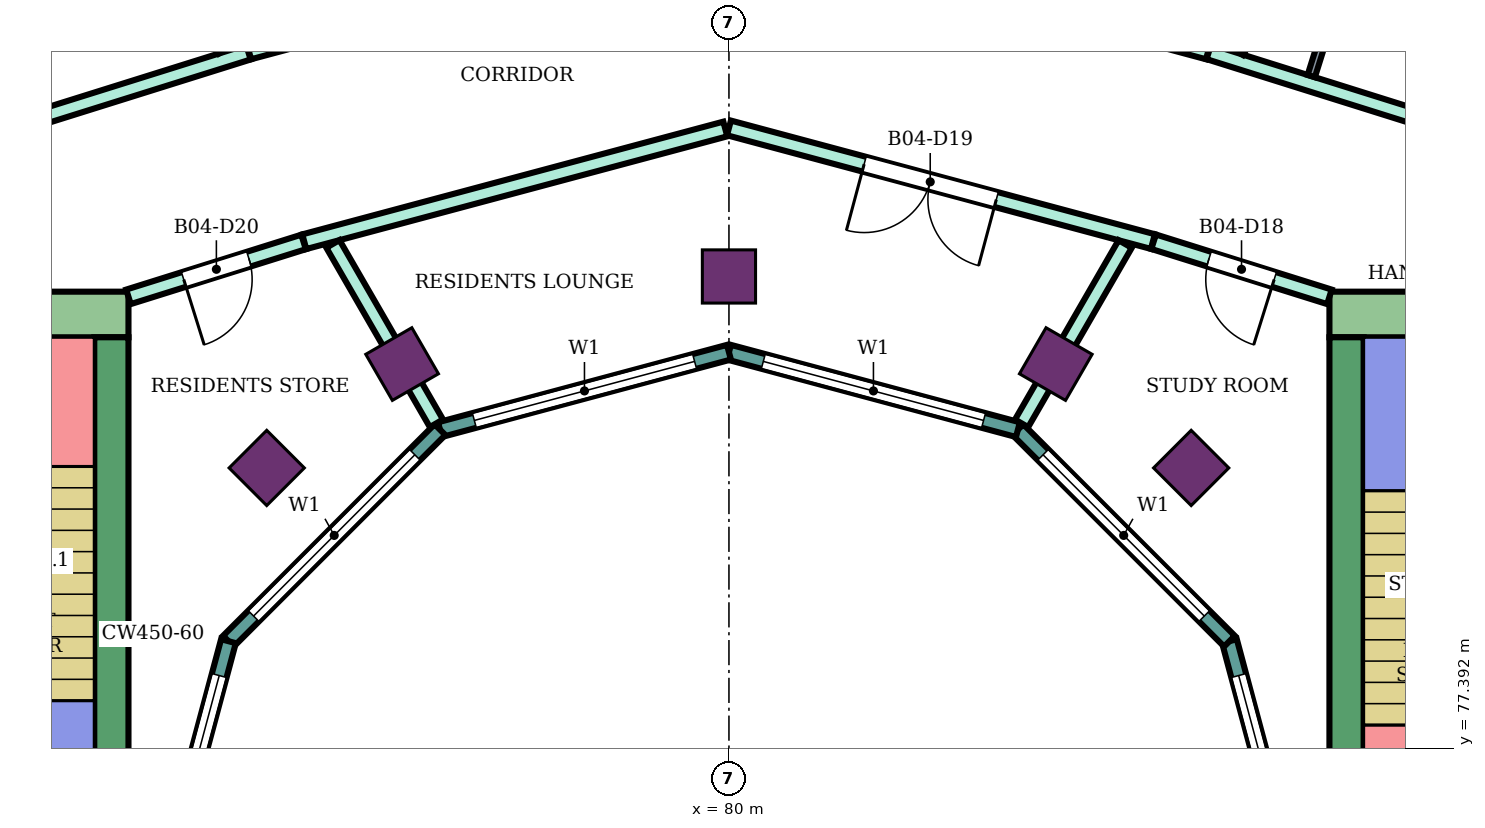
"""IFC4 building model, lengths in metres.
Left out: names, types, materials, properties, quantities, classifications, styles, units other than length and angle.
Written with IfcOpenShell. Run it as: python <this file> out.ifc"""

import sys

from ifc_helpers import new_model, si_unit, direction, frame, frame_2d, origin, origin_2d, place, context, subcontext, project, spatial, rectangle, extrude, element, fill, save


model = new_model("IFC4")
c1 = context("Model", 3, precision=1e-05, world=origin(), true_north=direction((0.0, 1.0)))
c2 = subcontext(c1, "Body", "Model", "MODEL_VIEW")
j1 = project(units=[si_unit("LENGTHUNIT", "METRE"), si_unit("PLANEANGLEUNIT", "RADIAN")], contexts=[c1])
p1 = place(None, origin())
s1 = spatial("IfcSite", under=j1, at=p1, CompositionType="ELEMENT")
p2 = place(p1, origin())
s2 = spatial("IfcBuilding", under=s1, at=p2, CompositionType="ELEMENT")
p3 = place(p2, frame((0.0, 0.0, 258.3)))
s3 = spatial("IfcBuildingStorey", under=s2, at=p3, CompositionType="ELEMENT", Elevation=258.3)
for number, where, z_axis, x_axis in (
    (1, (86.081, 81.081, 0.0), (0.0, 0.0, 1.0), (0.707, 0.707, 0.0)),
    (2, (84.3, 82.448, 0.0), (0.0, 0.0, 1.0), (0.5, 0.866, 0.0)),
    (3, (80.0, 83.6, 0.0), (0.0, 0.0, 1.0), (0.0, 1.0, 0.0)),
    (4, (75.7, 82.448, 0.0), (0.0, 0.0, 1.0), (-0.5, 0.866, 0.0)),
    (5, (73.919, 81.081, 0.0), (0.0, 0.0, 1.0), (-0.707, 0.707, 0.0)),
):
    element("IfcColumn", number, at=place(p3, frame(where, z_axis=z_axis, x_axis=x_axis)), inside=s3, PredefinedType="COLUMN", context=c2, shape_type="SweptSolid", body=[
        extrude(rectangle(XDim=0.7, YDim=0.7, at=origin_2d()), origin(), (0.0, 0.0, 1.0), 4.2),
    ])
p4 = place(p3, frame((87.9, 83.1, 0.0), z_axis=(0.0, 0.0, 1.0), x_axis=(1.0, 0.0, 0.0)))
e6 = element("IfcWall", 6, at=p4, inside=s3, PredefinedType="SHEAR", context=c2, shape_type="SweptSolid", body=[
    extrude(rectangle(XDim=14.9, YDim=0.6, at=frame_2d((7.45, 0.0))), origin(), (0.0, 0.0, 1.0), 3.88),
])
p5 = place(p4, frame((4.2, 0.0, 0.0)))
e7 = element("IfcOpeningElement", 7, at=p5, cuts=e6, PredefinedType="OPENING", context=c2, shape_type="SweptSolid", body=[
    extrude(rectangle(XDim=2.4, YDim=2.4, at=frame_2d((1.2, 1.2))), frame((0.0, 0.31, 0.0), z_axis=(0.0, -1.0, 0.0), x_axis=(1.0, 0.0, 0.0)), (0.0, 0.0, 1.0), 0.62),
])
p6 = place(p3, frame((88.125, 75.0, 0.0), z_axis=(0.0, 0.0, 1.0), x_axis=(0.0, 1.0, 0.0)))
e8 = element("IfcWall", 8, at=p6, inside=s3, PredefinedType="SHEAR", context=c2, shape_type="SweptSolid", body=[
    extrude(rectangle(XDim=7.8, YDim=0.45, at=frame_2d((3.9, 0.0))), origin(), (0.0, 0.0, 1.0), 3.88),
])
p7 = place(p3, frame((72.1, 83.1, 0.0), z_axis=(0.0, 0.0, 1.0), x_axis=(-1.0, 0.0, 0.0)))
e9 = element("IfcWall", 9, at=p7, inside=s3, PredefinedType="SHEAR", context=c2, shape_type="SweptSolid", body=[
    extrude(rectangle(XDim=14.9, YDim=0.6, at=frame_2d((7.45, 0.0))), origin(), (0.0, 0.0, 1.0), 3.88),
])
p8 = place(p7, frame((4.2, 0.0, 0.0)))
e10 = element("IfcOpeningElement", 10, at=p8, cuts=e9, PredefinedType="OPENING", context=c2, shape_type="SweptSolid", body=[
    extrude(rectangle(XDim=2.4, YDim=2.4, at=frame_2d((1.2, 1.2))), frame((0.0, 0.31, 0.0), z_axis=(0.0, -1.0, 0.0), x_axis=(1.0, 0.0, 0.0)), (0.0, 0.0, 1.0), 0.62),
])
p9 = place(p3, frame((71.875, 82.8, 0.0), z_axis=(0.0, 0.0, 1.0), x_axis=(0.0, -1.0, 0.0)))
e11 = element("IfcWall", 11, at=p9, inside=s3, PredefinedType="SHEAR", context=c2, shape_type="SweptSolid", body=[
    extrude(rectangle(XDim=7.8, YDim=0.45, at=frame_2d((3.9, 0.0))), origin(), (0.0, 0.0, 1.0), 3.88),
])
p10 = place(p3, frame((87.604, 75.0, 0.0), z_axis=(0.0, 0.0, 1.0), x_axis=(-0.258789828301, 0.965933654434, 0.0)))
e12 = element("IfcWall", 12, at=p10, inside=s3, PredefinedType="NOTDEFINED", context=c2, shape_type="SweptSolid", body=[
    extrude(rectangle(XDim=3.936, YDim=0.2, at=frame_2d((1.968, 0.0))), origin(), (0.0, 0.0, 1.0), 4.2),
])
p11 = place(p10, frame((0.468, 0.0, 0.9)))
e13 = element("IfcOpeningElement", 13, at=p11, cuts=e12, PredefinedType="OPENING", context=c2, shape_type="SweptSolid", body=[
    extrude(rectangle(XDim=3.0, YDim=2.3, at=frame_2d((1.5, 1.15))), frame((0.0, 0.11, 0.0), z_axis=(0.0, -1.0, 0.0), x_axis=(1.0, 0.0, 0.0)), (0.0, 0.0, 1.0), 0.22),
])
p12 = place(p3, frame((86.585, 78.802, 0.0), z_axis=(0.0, 0.0, 1.0), x_axis=(-0.707106781187, 0.707106781187, 0.0)))
e14 = element("IfcWall", 14, at=p12, inside=s3, PredefinedType="NOTDEFINED", context=c2, shape_type="SweptSolid", body=[
    extrude(rectangle(XDim=3.936, YDim=0.2, at=frame_2d((1.968, 0.0))), origin(), (0.0, 0.0, 1.0), 4.2),
])
p13 = place(p12, frame((0.468, 0.0, 0.9)))
e15 = element("IfcOpeningElement", 15, at=p13, cuts=e14, PredefinedType="OPENING", context=c2, shape_type="SweptSolid", body=[
    extrude(rectangle(XDim=3.0, YDim=2.3, at=frame_2d((1.5, 1.15))), frame((0.0, 0.11, 0.0), z_axis=(0.0, -1.0, 0.0), x_axis=(1.0, 0.0, 0.0)), (0.0, 0.0, 1.0), 0.22),
])
p14 = place(p3, frame((83.802, 81.585, 0.0), z_axis=(0.0, 0.0, 1.0), x_axis=(-0.965933654434, 0.258789828301, 0.0)))
e16 = element("IfcWall", 16, at=p14, inside=s3, PredefinedType="NOTDEFINED", context=c2, shape_type="SweptSolid", body=[
    extrude(rectangle(XDim=3.936, YDim=0.2, at=frame_2d((1.968, 0.0))), origin(), (0.0, 0.0, 1.0), 4.2),
])
p15 = place(p14, frame((0.468, 0.0, 0.9)))
e17 = element("IfcOpeningElement", 17, at=p15, cuts=e16, PredefinedType="OPENING", context=c2, shape_type="SweptSolid", body=[
    extrude(rectangle(XDim=3.0, YDim=2.3, at=frame_2d((1.5, 1.15))), frame((0.0, 0.11, 0.0), z_axis=(0.0, -1.0, 0.0), x_axis=(1.0, 0.0, 0.0)), (0.0, 0.0, 1.0), 0.22),
])
p16 = place(p3, frame((80.0, 82.604, 0.0), z_axis=(0.0, 0.0, 1.0), x_axis=(-0.965933654434, -0.258789828301, 0.0)))
e18 = element("IfcWall", 18, at=p16, inside=s3, PredefinedType="NOTDEFINED", context=c2, shape_type="SweptSolid", body=[
    extrude(rectangle(XDim=3.936, YDim=0.2, at=frame_2d((1.968, 0.0))), origin(), (0.0, 0.0, 1.0), 4.2),
])
p17 = place(p16, frame((0.468, 0.0, 0.9)))
e19 = element("IfcOpeningElement", 19, at=p17, cuts=e18, PredefinedType="OPENING", context=c2, shape_type="SweptSolid", body=[
    extrude(rectangle(XDim=3.0, YDim=2.3, at=frame_2d((1.5, 1.15))), frame((0.0, 0.11, 0.0), z_axis=(0.0, -1.0, 0.0), x_axis=(1.0, 0.0, 0.0)), (0.0, 0.0, 1.0), 0.22),
])
p18 = place(p3, frame((76.198, 81.585, 0.0), z_axis=(0.0, 0.0, 1.0), x_axis=(-0.707106781187, -0.707106781187, 0.0)))
e20 = element("IfcWall", 20, at=p18, inside=s3, PredefinedType="NOTDEFINED", context=c2, shape_type="SweptSolid", body=[
    extrude(rectangle(XDim=3.936, YDim=0.2, at=frame_2d((1.968, 0.0))), origin(), (0.0, 0.0, 1.0), 4.2),
])
p19 = place(p18, frame((0.468, 0.0, 0.9)))
e21 = element("IfcOpeningElement", 21, at=p19, cuts=e20, PredefinedType="OPENING", context=c2, shape_type="SweptSolid", body=[
    extrude(rectangle(XDim=3.0, YDim=2.3, at=frame_2d((1.5, 1.15))), frame((0.0, 0.11, 0.0), z_axis=(0.0, -1.0, 0.0), x_axis=(1.0, 0.0, 0.0)), (0.0, 0.0, 1.0), 0.22),
])
p20 = place(p3, frame((73.415, 78.802, 0.0), z_axis=(0.0, 0.0, 1.0), x_axis=(-0.258789828301, -0.965933654434, 0.0)))
e22 = element("IfcWall", 22, at=p20, inside=s3, PredefinedType="NOTDEFINED", context=c2, shape_type="SweptSolid", body=[
    extrude(rectangle(XDim=3.936, YDim=0.2, at=frame_2d((1.968, 0.0))), origin(), (0.0, 0.0, 1.0), 4.2),
])
p21 = place(p20, frame((0.468, 0.0, 0.9)))
e23 = element("IfcOpeningElement", 23, at=p21, cuts=e22, PredefinedType="OPENING", context=c2, shape_type="SweptSolid", body=[
    extrude(rectangle(XDim=3.0, YDim=2.3, at=frame_2d((1.5, 1.15))), frame((0.0, 0.11, 0.0), z_axis=(0.0, -1.0, 0.0), x_axis=(1.0, 0.0, 0.0)), (0.0, 0.0, 1.0), 0.22),
])
p22 = place(p3, frame((68.2, 84.834, 0.0), z_axis=(0.0, 0.0, 1.0), x_axis=(0.954260265251, 0.298977166624, 0.0)))
e24 = element("IfcWall", 24, at=p22, inside=s3, PredefinedType="PARTITIONING", context=c2, shape_type="SweptSolid", body=[
    extrude(rectangle(XDim=5.741, YDim=0.2, at=frame_2d((2.87, 0.0))), origin(), (0.0, 0.0, 1.0), 3.75),
])
p23 = place(p3, frame((72.1, 83.332, 0.0), z_axis=(0.0, 0.0, 1.0), x_axis=(0.954233106619, 0.299063836383, 0.0)))
e25 = element("IfcWall", 25, at=p23, inside=s3, PredefinedType="PARTITIONING", context=c2, shape_type="SweptSolid", body=[
    extrude(rectangle(XDim=2.414, YDim=0.2, at=frame_2d((1.207, 0.0))), origin(), (0.0, 0.0, 1.0), 3.75),
])
p24 = place(p23, frame((0.762, 0.0, 0.0)))
e26 = element("IfcOpeningElement", 26, at=p24, cuts=e25, PredefinedType="OPENING", context=c2, shape_type="SweptSolid", body=[
    extrude(rectangle(XDim=0.9, YDim=2.1, at=frame_2d((0.45, 1.05))), frame((0.0, 0.11, 0.0), z_axis=(0.0, -1.0, 0.0), x_axis=(1.0, 0.0, 0.0)), (0.0, 0.0, 1.0), 0.22),
])
p25 = place(p3, frame((73.687, 86.554, 0.0), z_axis=(0.0, 0.0, 1.0), x_axis=(0.965961994098, 0.258684027257, 0.0)))
e27 = element("IfcWall", 27, at=p25, inside=s3, PredefinedType="PARTITIONING", context=c2, shape_type="SweptSolid", body=[
    extrude(rectangle(XDim=6.486, YDim=0.2, at=frame_2d((3.243, 0.0))), origin(), (0.0, 0.0, 1.0), 3.75),
])
p26 = place(p25, frame((0.55, 0.0, 0.0)))
e28 = element("IfcOpeningElement", 28, at=p26, cuts=e27, PredefinedType="OPENING", context=c2, shape_type="SweptSolid", body=[
    extrude(rectangle(XDim=1.0, YDim=2.1, at=frame_2d((0.5, 1.05))), frame((0.0, 0.11, 0.0), z_axis=(0.0, -1.0, 0.0), x_axis=(1.0, 0.0, 0.0)), (0.0, 0.0, 1.0), 0.22),
])
p27 = place(p3, frame((74.413, 84.057, 0.0), z_axis=(0.0, 0.0, 1.0), x_axis=(0.965970849692, 0.258650956976, 0.0)))
e29 = element("IfcWall", 29, at=p27, inside=s3, PredefinedType="PARTITIONING", context=c2, shape_type="SweptSolid", body=[
    extrude(rectangle(XDim=5.734, YDim=0.2, at=frame_2d((2.867, 0.0))), origin(), (0.0, 0.0, 1.0), 3.75),
])
p28 = place(p3, frame((74.79, 84.028, 0.0), z_axis=(0.0, 0.0, 1.0), x_axis=(0.499859501914, -0.866106505198, 0.0)))
e30 = element("IfcWall", 30, at=p28, inside=s3, PredefinedType="PARTITIONING", context=c2, shape_type="SweptSolid", body=[
    extrude(rectangle(XDim=2.724, YDim=0.2, at=frame_2d((1.362, 0.0))), origin(), (0.0, 0.0, 1.0), 3.75),
])
p29 = place(p3, frame((80.0, 85.554, 0.0), z_axis=(0.0, 0.0, 1.0), x_axis=(0.965894438951, -0.258936155845, 0.0)))
e31 = element("IfcWall", 31, at=p29, inside=s3, PredefinedType="PARTITIONING", context=c2, shape_type="SweptSolid", body=[
    extrude(rectangle(XDim=5.774, YDim=0.2, at=frame_2d((2.887, 0.0))), origin(), (0.0, 0.0, 1.0), 3.75),
])
p30 = place(p29, frame((1.841, 0.0, 0.0)))
e32 = element("IfcOpeningElement", 32, at=p30, cuts=e31, PredefinedType="OPENING", context=c2, shape_type="SweptSolid", body=[
    extrude(rectangle(XDim=1.8, YDim=2.1, at=frame_2d((0.9, 1.05))), frame((0.0, 0.11, 0.0), z_axis=(0.0, -1.0, 0.0), x_axis=(1.0, 0.0, 0.0)), (0.0, 0.0, 1.0), 0.22),
])
p31 = place(p3, frame((80.048, 88.233, 0.0), z_axis=(0.0, 0.0, 1.0), x_axis=(0.965787353661, -0.259335280109, 0.0)))
e33 = element("IfcWall", 33, at=p31, inside=s3, PredefinedType="PARTITIONING", context=c2, shape_type="SweptSolid", body=[
    extrude(rectangle(XDim=6.476, YDim=0.2, at=frame_2d((3.238, 0.0))), origin(), (0.0, 0.0, 1.0), 3.75),
])
p32 = place(p31, frame((4.936, 0.0, 0.0)))
e34 = element("IfcOpeningElement", 34, at=p32, cuts=e33, PredefinedType="OPENING", context=c2, shape_type="SweptSolid", body=[
    extrude(rectangle(XDim=1.0, YDim=2.1, at=frame_2d((0.5, 1.05))), frame((0.0, 0.11, 0.0), z_axis=(0.0, -1.0, 0.0), x_axis=(1.0, 0.0, 0.0)), (0.0, 0.0, 1.0), 0.22),
])
p33 = place(p3, frame((83.85, 81.668, 0.0), z_axis=(0.0, 0.0, 1.0), x_axis=(0.500099931433, 0.865967700657, 0.0)))
e35 = element("IfcWall", 35, at=p33, inside=s3, PredefinedType="PARTITIONING", context=c2, shape_type="SweptSolid", body=[
    extrude(rectangle(XDim=2.725, YDim=0.2, at=frame_2d((1.362, 0.0))), origin(), (0.0, 0.0, 1.0), 3.75),
])
p34 = place(p3, frame((85.587, 84.057, 0.0), z_axis=(0.0, 0.0, 1.0), x_axis=(0.954239513179, -0.299043393987, 0.0)))
e36 = element("IfcWall", 36, at=p34, inside=s3, PredefinedType="PARTITIONING", context=c2, shape_type="SweptSolid", body=[
    extrude(rectangle(XDim=2.424, YDim=0.2, at=frame_2d((1.212, 0.0))), origin(), (0.0, 0.0, 1.0), 3.75),
])
p35 = place(p34, frame((0.762, 0.0, 0.0)))
e37 = element("IfcOpeningElement", 37, at=p35, cuts=e36, PredefinedType="OPENING", context=c2, shape_type="SweptSolid", body=[
    extrude(rectangle(XDim=0.9, YDim=2.1, at=frame_2d((0.45, 1.05))), frame((0.0, 0.11, 0.0), z_axis=(0.0, -1.0, 0.0), x_axis=(1.0, 0.0, 0.0)), (0.0, 0.0, 1.0), 0.22),
])
p36 = place(p3, frame((86.313, 86.554, 0.0), z_axis=(0.0, 0.0, 1.0), x_axis=(0.954077387881, -0.29956024091, 0.0)))
e38 = element("IfcWall", 38, at=p36, inside=s3, PredefinedType="PARTITIONING", context=c2, shape_type="SweptSolid", body=[
    extrude(rectangle(XDim=5.72, YDim=0.2, at=frame_2d((2.86, 0.0))), origin(), (0.0, 0.0, 1.0), 3.75),
])
p37 = place(p3, frame((86.677, 86.562, 0.0), z_axis=(0.0, 0.0, 1.0), x_axis=(0.500139020429, 0.865945125424, 0.0)))
e39 = element("IfcWall", 39, at=p37, inside=s3, PredefinedType="PARTITIONING", context=c2, shape_type="SweptSolid", body=[
    extrude(rectangle(XDim=12.446, YDim=0.2, at=frame_2d((6.223, 0.0))), origin(), (0.0, 0.0, 1.0), 3.75),
])
p38 = place(p3, frame((67.111, 97.347, 0.0), z_axis=(0.0, 0.0, 1.0), x_axis=(0.499428303955, -0.866355221147, 0.0)))
e40 = element("IfcWall", 40, at=p38, inside=s3, PredefinedType="PARTITIONING", context=c2, shape_type="SweptSolid", body=[
    extrude(rectangle(XDim=12.456, YDim=0.1, at=frame_2d((6.228, 0.0))), origin(), (0.0, 0.0, 1.0), 3.75),
])
p39 = place(p38, frame((2.538, 0.0, 0.0)))
e41 = element("IfcOpeningElement", 41, at=p39, cuts=e40, PredefinedType="OPENING", context=c2, shape_type="SweptSolid", body=[
    extrude(rectangle(XDim=0.9, YDim=2.1, at=frame_2d((0.45, 1.05))), frame((0.0, 0.06, 0.0), z_axis=(0.0, -1.0, 0.0), x_axis=(1.0, 0.0, 0.0)), (0.0, 0.0, 1.0), 0.12),
])
p40 = place(p38, frame((10.055, 0.0, 0.0)))
e42 = element("IfcOpeningElement", 42, at=p40, cuts=e40, PredefinedType="OPENING", context=c2, shape_type="SweptSolid", body=[
    extrude(rectangle(XDim=0.8, YDim=2.1, at=frame_2d((0.4, 1.05))), frame((0.0, 0.06, 0.0), z_axis=(0.0, -1.0, 0.0), x_axis=(1.0, 0.0, 0.0)), (0.0, 0.0, 1.0), 0.12),
])
p41 = place(p3, frame((87.661, 86.236, 0.0), z_axis=(0.0, 0.0, 1.0), x_axis=(0.299267255743, 0.954169329648, 0.0)))
e43 = element("IfcWall", 43, at=p41, inside=s3, PredefinedType="PARTITIONING", context=c2, shape_type="SweptSolid", body=[
    extrude(rectangle(XDim=3.95, YDim=0.1, at=frame_2d((1.975, 0.0))), origin(), (0.0, 0.0, 1.0), 3.75),
])
p42 = place(p11, origin())
e44 = element("IfcWindow", 44, at=p42, inside=s3, PartitioningType="SINGLE_PANEL", PredefinedType="WINDOW", context=c2, shape_type="SweptSolid", body=[
    extrude(rectangle(XDim=3.0, YDim=2.3, at=frame_2d((1.5, 1.15))), frame((0.0, 0.03, 0.0), z_axis=(0.0, -1.0, 0.0), x_axis=(1.0, 0.0, 0.0)), (0.0, 0.0, 1.0), 0.06),
])
fill(e13, e44)
p43 = place(p13, origin())
e45 = element("IfcWindow", 45, at=p43, inside=s3, PartitioningType="SINGLE_PANEL", PredefinedType="WINDOW", context=c2, shape_type="SweptSolid", body=[
    extrude(rectangle(XDim=3.0, YDim=2.3, at=frame_2d((1.5, 1.15))), frame((0.0, 0.03, 0.0), z_axis=(0.0, -1.0, 0.0), x_axis=(1.0, 0.0, 0.0)), (0.0, 0.0, 1.0), 0.06),
])
fill(e15, e45)
p44 = place(p15, origin())
e46 = element("IfcWindow", 46, at=p44, inside=s3, PartitioningType="SINGLE_PANEL", PredefinedType="WINDOW", context=c2, shape_type="SweptSolid", body=[
    extrude(rectangle(XDim=3.0, YDim=2.3, at=frame_2d((1.5, 1.15))), frame((0.0, 0.03, 0.0), z_axis=(0.0, -1.0, 0.0), x_axis=(1.0, 0.0, 0.0)), (0.0, 0.0, 1.0), 0.06),
])
fill(e17, e46)
p45 = place(p17, origin())
e47 = element("IfcWindow", 47, at=p45, inside=s3, PartitioningType="SINGLE_PANEL", PredefinedType="WINDOW", context=c2, shape_type="SweptSolid", body=[
    extrude(rectangle(XDim=3.0, YDim=2.3, at=frame_2d((1.5, 1.15))), frame((0.0, 0.03, 0.0), z_axis=(0.0, -1.0, 0.0), x_axis=(1.0, 0.0, 0.0)), (0.0, 0.0, 1.0), 0.06),
])
fill(e19, e47)
p46 = place(p19, origin())
e48 = element("IfcWindow", 48, at=p46, inside=s3, PartitioningType="SINGLE_PANEL", PredefinedType="WINDOW", context=c2, shape_type="SweptSolid", body=[
    extrude(rectangle(XDim=3.0, YDim=2.3, at=frame_2d((1.5, 1.15))), frame((0.0, 0.03, 0.0), z_axis=(0.0, -1.0, 0.0), x_axis=(1.0, 0.0, 0.0)), (0.0, 0.0, 1.0), 0.06),
])
fill(e21, e48)
p47 = place(p21, origin())
e49 = element("IfcWindow", 49, at=p47, inside=s3, PartitioningType="SINGLE_PANEL", PredefinedType="WINDOW", context=c2, shape_type="SweptSolid", body=[
    extrude(rectangle(XDim=3.0, YDim=2.3, at=frame_2d((1.5, 1.15))), frame((0.0, 0.03, 0.0), z_axis=(0.0, -1.0, 0.0), x_axis=(1.0, 0.0, 0.0)), (0.0, 0.0, 1.0), 0.06),
])
fill(e23, e49)
p48 = place(p35, frame((0.9, 0.0, 0.0), z_axis=(0.0, 0.0, 1.0), x_axis=(-1.0, 0.0, 0.0)))
e50 = element("IfcDoor", 50, at=p48, inside=s3, OperationType="SINGLE_SWING_LEFT", PredefinedType="DOOR", context=c2, shape_type="SweptSolid", body=[
    extrude(rectangle(XDim=0.9, YDim=2.1, at=frame_2d((0.45, 1.05))), frame((0.0, 0.025, 0.0), z_axis=(0.0, -1.0, 0.0), x_axis=(1.0, 0.0, 0.0)), (0.0, 0.0, 1.0), 0.05),
])
fill(e37, e50)
p49 = place(p30, frame((1.8, 0.0, 0.0), z_axis=(0.0, 0.0, 1.0), x_axis=(-1.0, 0.0, 0.0)))
e51 = element("IfcDoor", 51, at=p49, inside=s3, OperationType="DOUBLE_DOOR_SINGLE_SWING", PredefinedType="DOOR", context=c2, shape_type="SweptSolid", body=[
    extrude(rectangle(XDim=1.8, YDim=2.1, at=frame_2d((0.9, 1.05))), frame((0.0, 0.025, 0.0), z_axis=(0.0, -1.0, 0.0), x_axis=(1.0, 0.0, 0.0)), (0.0, 0.0, 1.0), 0.05),
])
fill(e32, e51)
p50 = place(p24, frame((0.9, 0.0, 0.0), z_axis=(0.0, 0.0, 1.0), x_axis=(-1.0, 0.0, 0.0)))
e52 = element("IfcDoor", 52, at=p50, inside=s3, OperationType="SINGLE_SWING_RIGHT", PredefinedType="DOOR", context=c2, shape_type="SweptSolid", body=[
    extrude(rectangle(XDim=0.9, YDim=2.1, at=frame_2d((0.45, 1.05))), frame((0.0, 0.025, 0.0), z_axis=(0.0, -1.0, 0.0), x_axis=(1.0, 0.0, 0.0)), (0.0, 0.0, 1.0), 0.05),
])
fill(e26, e52)
save(model, sys.argv[1])
